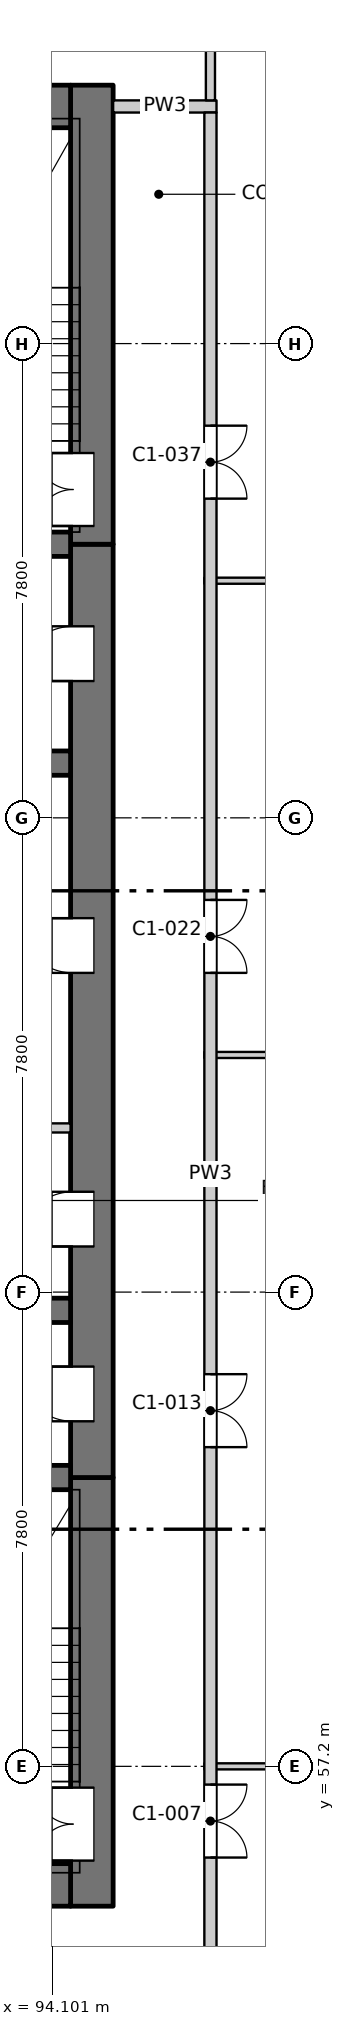
"""IFC4 building model, lengths in metres.
Left out: names, types, materials, properties, quantities, classifications, styles, units other than length and angle.
Written with IfcOpenShell. Run it as: python <this file> out.ifc"""

import sys

from ifc_helpers import new_model, si_unit, direction, frame, frame_2d, origin, place, context, subcontext, project, spatial, rectangle, extrude, element, fill, save


model = new_model("IFC4")
c1 = context("Model", 3, precision=1e-05, world=origin(), true_north=direction((0.0, 1.0)))
c2 = subcontext(c1, "Body", "Model", "MODEL_VIEW")
j1 = project(units=[si_unit("LENGTHUNIT", "METRE"), si_unit("PLANEANGLEUNIT", "RADIAN")], contexts=[c1])
p1 = place(None, origin())
s1 = spatial("IfcSite", under=j1, at=p1, CompositionType="ELEMENT")
p2 = place(p1, origin())
s2 = spatial("IfcBuilding", under=s1, at=p2, CompositionType="ELEMENT")
p3 = place(p2, frame((0.0, 0.0, 71.6)))
s3 = spatial("IfcBuildingStorey", under=s2, at=p3, CompositionType="ELEMENT", Elevation=71.6)
p4 = place(p3, frame((94.75, 54.9, -0.25), z_axis=(0.0, 0.0, 1.0), x_axis=(0.0, 1.0, 0.0)))
e1 = element("IfcWall", 1, at=p4, inside=s3, PredefinedType="SOLIDWALL", context=c2, shape_type="SweptSolid", body=[
    extrude(rectangle(XDim=7.05, YDim=0.7, at=frame_2d((3.525, 0.0))), origin(), (0.0, 0.0, 1.0), 3.4),
])
p5 = place(p4, frame((0.75, 0.0, 0.25)))
e2 = element("IfcOpeningElement", 2, at=p5, cuts=e1, PredefinedType="OPENING", context=c2, shape_type="SweptSolid", body=[
    extrude(rectangle(XDim=1.2, YDim=2.1, at=frame_2d((0.6, 1.05))), frame((0.0, 0.36, 0.0), z_axis=(0.0, -1.0, 0.0), x_axis=(1.0, 0.0, 0.0)), (0.0, 0.0, 1.0), 0.72),
])
p6 = place(p3, frame((94.75, 61.95, -0.25), z_axis=(0.0, 0.0, 1.0), x_axis=(0.0, 1.0, 0.0)))
e3 = element("IfcWall", 3, at=p6, inside=s3, PredefinedType="SOLIDWALL", context=c2, shape_type="SweptSolid", body=[
    extrude(rectangle(XDim=15.35, YDim=0.7, at=frame_2d((7.675, 0.0))), origin(), (0.0, 0.0, 1.0), 3.4),
])
p7 = place(p6, frame((0.925, 0.0, 0.25)))
e4 = element("IfcOpeningElement", 4, at=p7, cuts=e3, PredefinedType="OPENING", context=c2, shape_type="SweptSolid", body=[
    extrude(rectangle(XDim=0.9, YDim=2.1, at=frame_2d((0.45, 1.05))), frame((0.0, 0.36, 0.0), z_axis=(0.0, -1.0, 0.0), x_axis=(1.0, 0.0, 0.0)), (0.0, 0.0, 1.0), 0.72),
])
p8 = place(p6, frame((3.8, 0.0, 0.25)))
e5 = element("IfcOpeningElement", 5, at=p8, cuts=e3, PredefinedType="OPENING", context=c2, shape_type="SweptSolid", body=[
    extrude(rectangle(XDim=0.9, YDim=2.1, at=frame_2d((0.45, 1.05))), frame((0.0, 0.36, 0.0), z_axis=(0.0, -1.0, 0.0), x_axis=(1.0, 0.0, 0.0)), (0.0, 0.0, 1.0), 0.72),
])
p9 = place(p6, frame((8.3, 0.0, 0.25)))
e6 = element("IfcOpeningElement", 6, at=p9, cuts=e3, PredefinedType="OPENING", context=c2, shape_type="SweptSolid", body=[
    extrude(rectangle(XDim=0.9, YDim=2.1, at=frame_2d((0.45, 1.05))), frame((0.0, 0.36, 0.0), z_axis=(0.0, -1.0, 0.0), x_axis=(1.0, 0.0, 0.0)), (0.0, 0.0, 1.0), 0.72),
])
p10 = place(p6, frame((13.1, 0.0, 0.25)))
e7 = element("IfcOpeningElement", 7, at=p10, cuts=e3, PredefinedType="OPENING", context=c2, shape_type="SweptSolid", body=[
    extrude(rectangle(XDim=0.9, YDim=2.1, at=frame_2d((0.45, 1.05))), frame((0.0, 0.36, 0.0), z_axis=(0.0, -1.0, 0.0), x_axis=(1.0, 0.0, 0.0)), (0.0, 0.0, 1.0), 0.72),
])
p11 = place(p3, frame((94.75, 77.3, -0.25), z_axis=(0.0, 0.0, 1.0), x_axis=(0.0, 1.0, 0.0)))
e8 = element("IfcWall", 8, at=p11, inside=s3, PredefinedType="SOLIDWALL", context=c2, shape_type="SweptSolid", body=[
    extrude(rectangle(XDim=7.55, YDim=0.7, at=frame_2d((3.775, 0.0))), origin(), (0.0, 0.0, 1.0), 3.4),
])
p12 = place(p11, frame((0.3, 0.0, 0.25)))
e9 = element("IfcOpeningElement", 9, at=p12, cuts=e8, PredefinedType="OPENING", context=c2, shape_type="SweptSolid", body=[
    extrude(rectangle(XDim=1.2, YDim=2.1, at=frame_2d((0.6, 1.05))), frame((0.0, 0.36, 0.0), z_axis=(0.0, -1.0, 0.0), x_axis=(1.0, 0.0, 0.0)), (0.0, 0.0, 1.0), 0.72),
])
p13 = place(p3, frame((75.6, 55.25, -0.25), z_axis=(0.0, 0.0, 1.0), x_axis=(1.0, 0.0, 0.0)))
e10 = element("IfcWall", 10, at=p13, inside=s3, PredefinedType="SOLIDWALL", context=c2, shape_type="SweptSolid", body=[
    extrude(rectangle(XDim=18.8, YDim=0.7, at=frame_2d((9.4, 0.0))), origin(), (0.0, 0.0, 1.0), 3.4),
])
p14 = place(p13, frame((8.65, 0.0, 0.25)))
e11 = element("IfcOpeningElement", 11, at=p14, cuts=e10, PredefinedType="OPENING", context=c2, shape_type="SweptSolid", body=[
    extrude(rectangle(XDim=1.5, YDim=2.1, at=frame_2d((0.75, 1.05))), frame((0.0, 0.36, 0.0), z_axis=(0.0, -1.0, 0.0), x_axis=(1.0, 0.0, 0.0)), (0.0, 0.0, 1.0), 0.72),
])
p15 = place(p3, frame((75.6, 84.5, -0.25), z_axis=(0.0, 0.0, 1.0), x_axis=(1.0, 0.0, 0.0)))
e12 = element("IfcWall", 12, at=p15, inside=s3, PredefinedType="SOLIDWALL", context=c2, shape_type="SweptSolid", body=[
    extrude(rectangle(XDim=18.8, YDim=0.7, at=frame_2d((9.4, 0.0))), origin(), (0.0, 0.0, 1.0), 3.4),
])
for number, where, z_axis, x_axis in (
    (13, (90.75, 61.95, -0.25), (0.0, 0.0, 1.0), (1.0, 0.0, 0.0)),
    (14, (90.75, 64.7, -0.25), (0.0, 0.0, 1.0), (1.0, 0.0, 0.0)),
    (15, (90.75, 73.7, -0.25), (0.0, 0.0, 1.0), (1.0, 0.0, 0.0)),
    (16, (90.75, 77.3, -0.25), (0.0, 0.0, 1.0), (1.0, 0.0, 0.0)),
):
    element("IfcWall", number, at=place(p3, frame(where, z_axis=z_axis, x_axis=x_axis)), inside=s3, PredefinedType="SOLIDWALL", context=c2, shape_type="SweptSolid", body=[
        extrude(rectangle(XDim=3.65, YDim=0.4, at=frame_2d((1.825, 0.0))), origin(), (0.0, 0.0, 1.0), 3.4),
    ])
p16 = place(p3, frame((96.6, 57.2, 0.0), z_axis=(0.0, 0.0, 1.0), x_axis=(1.0, 0.0, 0.0)))
e17 = element("IfcWall", 17, at=p16, inside=s3, PredefinedType="PARTITIONING", context=c2, shape_type="SweptSolid", body=[
    extrude(rectangle(XDim=4.0, YDim=0.1, at=frame_2d((2.0, 0.0))), origin(), (0.0, 0.0, 1.0), 3.15),
])
p17 = place(p3, frame((90.75, 67.7, 0.0), z_axis=(0.0, 0.0, 1.0), x_axis=(1.0, 0.0, 0.0)))
e18 = element("IfcWall", 18, at=p17, inside=s3, PredefinedType="PARTITIONING", context=c2, shape_type="SweptSolid", body=[
    extrude(rectangle(XDim=3.65, YDim=0.15, at=frame_2d((1.825, 0.0))), origin(), (0.0, 0.0, 1.0), 3.15),
])
for number, where, z_axis, x_axis in (
    (19, (96.6, 68.9, 0.0), (0.0, 0.0, 1.0), (1.0, 0.0, 0.0)),
    (20, (96.6, 76.7, 0.0), (0.0, 0.0, 1.0), (1.0, 0.0, 0.0)),
):
    element("IfcWall", number, at=place(p3, frame(where, z_axis=z_axis, x_axis=x_axis)), inside=s3, PredefinedType="PARTITIONING", context=c2, shape_type="SweptSolid", body=[
        extrude(rectangle(XDim=11.665, YDim=0.1, at=frame_2d((5.833, 0.0))), origin(), (0.0, 0.0, 1.0), 3.15),
    ])
p18 = place(p3, frame((95.1, 84.5, 0.0), z_axis=(0.0, 0.0, 1.0), x_axis=(1.0, 0.0, 0.0)))
e21 = element("IfcWall", 21, at=p18, inside=s3, PredefinedType="PARTITIONING", context=c2, shape_type="SweptSolid", body=[
    extrude(rectangle(XDim=1.7, YDim=0.2, at=frame_2d((0.85, 0.0))), origin(), (0.0, 0.0, 1.0), 3.15),
])
p19 = place(p3, frame((96.7, 49.5, 0.0), z_axis=(0.0, 0.0, 1.0), x_axis=(0.0, 1.0, 0.0)))
e22 = element("IfcWall", 22, at=p19, inside=s3, PredefinedType="PARTITIONING", context=c2, shape_type="SweptSolid", body=[
    extrude(rectangle(XDim=34.9, YDim=0.2, at=frame_2d((17.45, 0.0))), origin(), (0.0, 0.0, 1.0), 3.15),
])
p20 = place(p19, frame((6.2, 0.0, 0.0)))
e23 = element("IfcOpeningElement", 23, at=p20, cuts=e22, PredefinedType="OPENING", context=c2, shape_type="SweptSolid", body=[
    extrude(rectangle(XDim=1.2, YDim=2.1, at=frame_2d((0.6, 1.05))), frame((0.0, 0.11, 0.0), z_axis=(0.0, -1.0, 0.0), x_axis=(1.0, 0.0, 0.0)), (0.0, 0.0, 1.0), 0.22),
])
p21 = place(p19, frame((12.95, 0.0, 0.0)))
e24 = element("IfcOpeningElement", 24, at=p21, cuts=e22, PredefinedType="OPENING", context=c2, shape_type="SweptSolid", body=[
    extrude(rectangle(XDim=1.2, YDim=2.1, at=frame_2d((0.6, 1.05))), frame((0.0, 0.11, 0.0), z_axis=(0.0, -1.0, 0.0), x_axis=(1.0, 0.0, 0.0)), (0.0, 0.0, 1.0), 0.22),
])
p22 = place(p19, frame((20.75, 0.0, 0.0)))
e25 = element("IfcOpeningElement", 25, at=p22, cuts=e22, PredefinedType="OPENING", context=c2, shape_type="SweptSolid", body=[
    extrude(rectangle(XDim=1.2, YDim=2.1, at=frame_2d((0.6, 1.05))), frame((0.0, 0.11, 0.0), z_axis=(0.0, -1.0, 0.0), x_axis=(1.0, 0.0, 0.0)), (0.0, 0.0, 1.0), 0.22),
])
p23 = place(p19, frame((28.55, 0.0, 0.0)))
e26 = element("IfcOpeningElement", 26, at=p23, cuts=e22, PredefinedType="OPENING", context=c2, shape_type="SweptSolid", body=[
    extrude(rectangle(XDim=1.2, YDim=2.1, at=frame_2d((0.6, 1.05))), frame((0.0, 0.11, 0.0), z_axis=(0.0, -1.0, 0.0), x_axis=(1.0, 0.0, 0.0)), (0.0, 0.0, 1.0), 0.22),
])
p24 = place(p3, frame((96.7, 84.6, 0.0), z_axis=(0.0, 0.0, 1.0), x_axis=(0.0, 1.0, 0.0)))
e27 = element("IfcWall", 27, at=p24, inside=s3, PredefinedType="PARTITIONING", context=c2, shape_type="SweptSolid", body=[
    extrude(rectangle(XDim=3.665, YDim=0.15, at=frame_2d((1.833, 0.0))), origin(), (0.0, 0.0, 1.0), 3.15),
])
p25 = place(p24, frame((1.25, 0.0, 0.0)))
e28 = element("IfcOpeningElement", 28, at=p25, cuts=e27, PredefinedType="OPENING", context=c2, shape_type="SweptSolid", body=[
    extrude(rectangle(XDim=1.2, YDim=2.1, at=frame_2d((0.6, 1.05))), frame((0.0, 0.085, 0.0), z_axis=(0.0, -1.0, 0.0), x_axis=(1.0, 0.0, 0.0)), (0.0, 0.0, 1.0), 0.17),
])
p26 = place(p5, origin())
e29 = element("IfcDoor", 29, at=p26, inside=s3, OperationType="DOUBLE_DOOR_SINGLE_SWING", PredefinedType="DOOR", context=c2, shape_type="SweptSolid", body=[
    extrude(rectangle(XDim=1.2, YDim=2.1, at=frame_2d((0.6, 1.05))), frame((0.0, 0.335, 0.0), z_axis=(0.0, -1.0, 0.0), x_axis=(1.0, 0.0, 0.0)), (0.0, 0.0, 1.0), 0.05),
])
fill(e2, e29)
p27 = place(p20, origin())
e30 = element("IfcDoor", 30, at=p27, inside=s3, OperationType="DOUBLE_DOOR_SINGLE_SWING", PredefinedType="DOOR", context=c2, shape_type="SweptSolid", body=[
    extrude(rectangle(XDim=1.2, YDim=2.1, at=frame_2d((0.6, 1.05))), frame((0.0, 0.025, 0.0), z_axis=(0.0, -1.0, 0.0), x_axis=(1.0, 0.0, 0.0)), (0.0, 0.0, 1.0), 0.05),
])
fill(e23, e30)
p28 = place(p21, origin())
e31 = element("IfcDoor", 31, at=p28, inside=s3, OperationType="DOUBLE_DOOR_SINGLE_SWING", PredefinedType="DOOR", context=c2, shape_type="SweptSolid", body=[
    extrude(rectangle(XDim=1.2, YDim=2.1, at=frame_2d((0.6, 1.05))), frame((0.0, 0.025, 0.0), z_axis=(0.0, -1.0, 0.0), x_axis=(1.0, 0.0, 0.0)), (0.0, 0.0, 1.0), 0.05),
])
fill(e24, e31)
p29 = place(p7, origin())
e32 = element("IfcDoor", 32, at=p29, inside=s3, OperationType="SINGLE_SWING_RIGHT", PredefinedType="DOOR", context=c2, shape_type="SweptSolid", body=[
    extrude(rectangle(XDim=0.9, YDim=2.1, at=frame_2d((0.45, 1.05))), frame((0.0, 0.335, 0.0), z_axis=(0.0, -1.0, 0.0), x_axis=(1.0, 0.0, 0.0)), (0.0, 0.0, 1.0), 0.05),
])
fill(e4, e32)
p30 = place(p8, origin())
e33 = element("IfcDoor", 33, at=p30, inside=s3, OperationType="SINGLE_SWING_LEFT", PredefinedType="DOOR", context=c2, shape_type="SweptSolid", body=[
    extrude(rectangle(XDim=0.9, YDim=2.1, at=frame_2d((0.45, 1.05))), frame((0.0, 0.335, 0.0), z_axis=(0.0, -1.0, 0.0), x_axis=(1.0, 0.0, 0.0)), (0.0, 0.0, 1.0), 0.05),
])
fill(e5, e33)
p31 = place(p9, origin())
e34 = element("IfcDoor", 34, at=p31, inside=s3, OperationType="SINGLE_SWING_RIGHT", PredefinedType="DOOR", context=c2, shape_type="SweptSolid", body=[
    extrude(rectangle(XDim=0.9, YDim=2.1, at=frame_2d((0.45, 1.05))), frame((0.0, 0.335, 0.0), z_axis=(0.0, -1.0, 0.0), x_axis=(1.0, 0.0, 0.0)), (0.0, 0.0, 1.0), 0.05),
])
fill(e6, e34)
p32 = place(p22, origin())
e35 = element("IfcDoor", 35, at=p32, inside=s3, OperationType="DOUBLE_DOOR_SINGLE_SWING", PredefinedType="DOOR", context=c2, shape_type="SweptSolid", body=[
    extrude(rectangle(XDim=1.2, YDim=2.1, at=frame_2d((0.6, 1.05))), frame((0.0, 0.025, 0.0), z_axis=(0.0, -1.0, 0.0), x_axis=(1.0, 0.0, 0.0)), (0.0, 0.0, 1.0), 0.05),
])
fill(e25, e35)
p33 = place(p10, origin())
e36 = element("IfcDoor", 36, at=p33, inside=s3, OperationType="SINGLE_SWING_LEFT", PredefinedType="DOOR", context=c2, shape_type="SweptSolid", body=[
    extrude(rectangle(XDim=0.9, YDim=2.1, at=frame_2d((0.45, 1.05))), frame((0.0, 0.335, 0.0), z_axis=(0.0, -1.0, 0.0), x_axis=(1.0, 0.0, 0.0)), (0.0, 0.0, 1.0), 0.05),
])
fill(e7, e36)
p34 = place(p12, origin())
e37 = element("IfcDoor", 37, at=p34, inside=s3, OperationType="DOUBLE_DOOR_SINGLE_SWING", PredefinedType="DOOR", context=c2, shape_type="SweptSolid", body=[
    extrude(rectangle(XDim=1.2, YDim=2.1, at=frame_2d((0.6, 1.05))), frame((0.0, 0.335, 0.0), z_axis=(0.0, -1.0, 0.0), x_axis=(1.0, 0.0, 0.0)), (0.0, 0.0, 1.0), 0.05),
])
fill(e9, e37)
p35 = place(p23, origin())
e38 = element("IfcDoor", 38, at=p35, inside=s3, OperationType="DOUBLE_DOOR_SINGLE_SWING", PredefinedType="DOOR", context=c2, shape_type="SweptSolid", body=[
    extrude(rectangle(XDim=1.2, YDim=2.1, at=frame_2d((0.6, 1.05))), frame((0.0, 0.025, 0.0), z_axis=(0.0, -1.0, 0.0), x_axis=(1.0, 0.0, 0.0)), (0.0, 0.0, 1.0), 0.05),
])
fill(e26, e38)
save(model, sys.argv[1])
